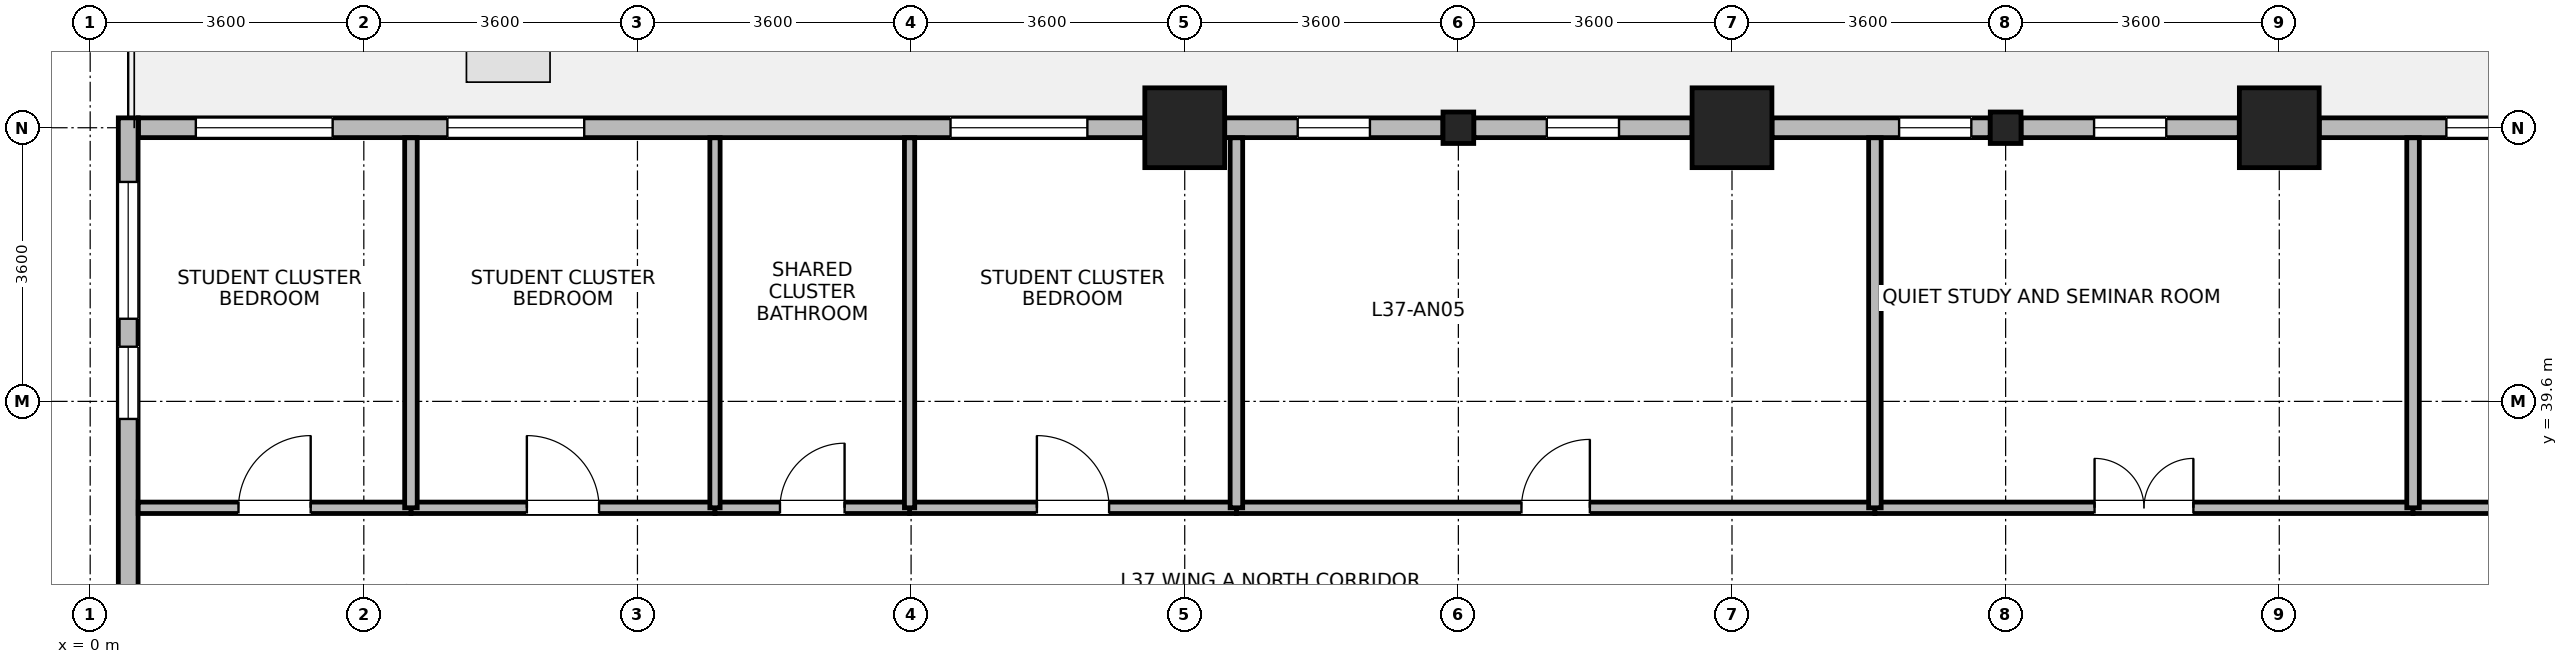
"""IFC4 building model, lengths in metres.
Left out: names, types, materials, properties, quantities, classifications, styles, units other than length and angle.
Written with IfcOpenShell. Run it as: python <this file> out.ifc"""

import sys

from ifc_helpers import new_model, si_unit, direction, frame, frame_2d, origin, origin_2d, place, context, subcontext, project, spatial, rectangle, i_section, extrude, source, transform, mapped, element, fill, save


model = new_model("IFC4")
c1 = context("Model", 3, precision=1e-05, world=origin(), true_north=direction((0.0, 1.0)))
c2 = subcontext(c1, "Body", "Model", "MODEL_VIEW")
j1 = project(units=[si_unit("LENGTHUNIT", "METRE"), si_unit("PLANEANGLEUNIT", "RADIAN")], contexts=[c1])
p1 = place(None, origin())
s1 = spatial("IfcSite", under=j1, at=p1, CompositionType="ELEMENT")
p2 = place(p1, origin())
s2 = spatial("IfcBuilding", under=s1, at=p2, CompositionType="ELEMENT")
p3 = place(p2, frame((0.0, 0.0, 147.6)))
s3 = spatial("IfcBuildingStorey", under=s2, at=p3, CompositionType="ELEMENT", Elevation=147.6)
m1 = source(origin(), c2, "Body", "SweptSolid", [
    extrude(rectangle(XDim=1.05, YDim=1.05, at=origin_2d()), origin(), (0.0, 0.0, 1.0), 3.7),
])
for number, where, z_axis, x_axis in (
    (1, (14.4, 43.2, 0.0), (0.0, 0.0, 1.0), (1.0, 0.0, 0.0)),
    (2, (21.6, 43.2, 0.0), (0.0, 0.0, 1.0), (1.0, 0.0, 0.0)),
    (3, (28.8, 43.2, 0.0), (0.0, 0.0, 1.0), (1.0, 0.0, 0.0)),
):
    element("IfcColumn", number, at=place(p3, frame(where, z_axis=z_axis, x_axis=x_axis)), inside=s3, PredefinedType="COLUMN", context=c2, shape_type="MappedRepresentation", body=[
        mapped(m1, transform((0.0, 0.0, 0.0), x_axis=(1.0, 0.0, 0.0), y_axis=(0.0, 1.0, 0.0), z_axis=(0.0, 0.0, 1.0), scale=1.0)),
    ])
m2 = source(origin(), c2, "Body", "SweptSolid", [
    extrude(i_section(OverallWidth=0.404, OverallDepth=0.414, WebThickness=0.021, FlangeThickness=0.028, FilletRadius=0.015, at=origin_2d()), origin(), (0.0, 0.0, 1.0), 3.7),
])
for number, where, z_axis, x_axis in (
    (4, (18.0, 43.2, 0.0), (0.0, 0.0, 1.0), (1.0, 0.0, 0.0)),
    (5, (25.2, 43.2, 0.0), (0.0, 0.0, 1.0), (1.0, 0.0, 0.0)),
):
    element("IfcColumn", number, at=place(p3, frame(where, z_axis=z_axis, x_axis=x_axis)), inside=s3, PredefinedType="COLUMN", context=c2, shape_type="MappedRepresentation", body=[
        mapped(m2, transform((0.0, 0.0, 0.0), x_axis=(1.0, 0.0, 0.0), y_axis=(0.0, 1.0, 0.0), z_axis=(0.0, 0.0, 1.0), scale=1.0)),
    ])
p4 = place(p3, frame((29.326, 43.2, 0.0), z_axis=(0.0, 0.0, 1.0), x_axis=(1.0, 0.0, 0.0)))
e6 = element("IfcWall", 6, at=p4, inside=s3, PredefinedType="STANDARD", context=c2, shape_type="SweptSolid", body=[
    extrude(rectangle(XDim=2.871, YDim=0.26, at=frame_2d((1.436, 0.0))), origin(), (0.0, 0.0, 1.0), 2.99),
])
p5 = place(p4, frame((1.673, 0.0, 0.85)))
e7 = element("IfcOpeningElement", 7, at=p5, cuts=e6, PredefinedType="OPENING", context=c2, shape_type="SweptSolid", body=[
    extrude(rectangle(XDim=0.95, YDim=1.75, at=frame_2d((0.475, 0.875))), frame((0.0, 0.14, 0.0), z_axis=(0.0, -1.0, 0.0), x_axis=(1.0, 0.0, 0.0)), (0.0, 0.0, 1.0), 0.28),
])
p6 = place(p3, frame((25.403, 43.2, 0.0), z_axis=(0.0, 0.0, 1.0), x_axis=(1.0, 0.0, 0.0)))
e8 = element("IfcWall", 8, at=p6, inside=s3, PredefinedType="STANDARD", context=c2, shape_type="SweptSolid", body=[
    extrude(rectangle(XDim=2.871, YDim=0.26, at=frame_2d((1.436, 0.0))), origin(), (0.0, 0.0, 1.0), 2.99),
])
p7 = place(p6, frame((0.96, 0.0, 0.85)))
e9 = element("IfcOpeningElement", 9, at=p7, cuts=e8, PredefinedType="OPENING", context=c2, shape_type="SweptSolid", body=[
    extrude(rectangle(XDim=0.95, YDim=1.75, at=frame_2d((0.475, 0.875))), frame((0.0, 0.14, 0.0), z_axis=(0.0, -1.0, 0.0), x_axis=(1.0, 0.0, 0.0)), (0.0, 0.0, 1.0), 0.28),
])
p8 = place(p3, frame((22.126, 43.2, 0.0), z_axis=(0.0, 0.0, 1.0), x_axis=(1.0, 0.0, 0.0)))
e10 = element("IfcWall", 10, at=p8, inside=s3, PredefinedType="STANDARD", context=c2, shape_type="SweptSolid", body=[
    extrude(rectangle(XDim=2.871, YDim=0.26, at=frame_2d((1.436, 0.0))), origin(), (0.0, 0.0, 1.0), 2.99),
])
p9 = place(p8, frame((1.673, 0.0, 0.85)))
e11 = element("IfcOpeningElement", 11, at=p9, cuts=e10, PredefinedType="OPENING", context=c2, shape_type="SweptSolid", body=[
    extrude(rectangle(XDim=0.95, YDim=1.75, at=frame_2d((0.475, 0.875))), frame((0.0, 0.14, 0.0), z_axis=(0.0, -1.0, 0.0), x_axis=(1.0, 0.0, 0.0)), (0.0, 0.0, 1.0), 0.28),
])
p10 = place(p3, frame((18.203, 43.2, 0.0), z_axis=(0.0, 0.0, 1.0), x_axis=(1.0, 0.0, 0.0)))
e12 = element("IfcWall", 12, at=p10, inside=s3, PredefinedType="STANDARD", context=c2, shape_type="SweptSolid", body=[
    extrude(rectangle(XDim=2.871, YDim=0.26, at=frame_2d((1.436, 0.0))), origin(), (0.0, 0.0, 1.0), 2.99),
])
p11 = place(p10, frame((0.96, 0.0, 0.85)))
e13 = element("IfcOpeningElement", 13, at=p11, cuts=e12, PredefinedType="OPENING", context=c2, shape_type="SweptSolid", body=[
    extrude(rectangle(XDim=0.95, YDim=1.75, at=frame_2d((0.475, 0.875))), frame((0.0, 0.14, 0.0), z_axis=(0.0, -1.0, 0.0), x_axis=(1.0, 0.0, 0.0)), (0.0, 0.0, 1.0), 0.28),
])
p12 = place(p3, frame((14.926, 43.2, 0.0), z_axis=(0.0, 0.0, 1.0), x_axis=(1.0, 0.0, 0.0)))
e14 = element("IfcWall", 14, at=p12, inside=s3, PredefinedType="STANDARD", context=c2, shape_type="SweptSolid", body=[
    extrude(rectangle(XDim=2.871, YDim=0.26, at=frame_2d((1.436, 0.0))), origin(), (0.0, 0.0, 1.0), 2.99),
])
p13 = place(p12, frame((0.96, 0.0, 0.85)))
e15 = element("IfcOpeningElement", 15, at=p13, cuts=e14, PredefinedType="OPENING", context=c2, shape_type="SweptSolid", body=[
    extrude(rectangle(XDim=0.95, YDim=1.75, at=frame_2d((0.475, 0.875))), frame((0.0, 0.14, 0.0), z_axis=(0.0, -1.0, 0.0), x_axis=(1.0, 0.0, 0.0)), (0.0, 0.0, 1.0), 0.28),
])
p14 = place(p3, frame((0.635, 43.2, 0.0), z_axis=(0.0, 0.0, 1.0), x_axis=(1.0, 0.0, 0.0)))
e16 = element("IfcWall", 16, at=p14, inside=s3, PredefinedType="STANDARD", context=c2, shape_type="SweptSolid", body=[
    extrude(rectangle(XDim=13.239, YDim=0.26, at=frame_2d((6.62, 0.0))), origin(), (0.0, 0.0, 1.0), 3.44),
])
p15 = place(p14, frame((0.755, 0.0, 0.85)))
e17 = element("IfcOpeningElement", 17, at=p15, cuts=e16, PredefinedType="OPENING", context=c2, shape_type="SweptSolid", body=[
    extrude(rectangle(XDim=1.8, YDim=1.85, at=frame_2d((0.9, 0.925))), frame((0.0, 0.14, 0.0), z_axis=(0.0, -1.0, 0.0), x_axis=(1.0, 0.0, 0.0)), (0.0, 0.0, 1.0), 0.28),
])
p16 = place(p14, frame((4.065, 0.0, 0.85)))
e18 = element("IfcOpeningElement", 18, at=p16, cuts=e16, PredefinedType="OPENING", context=c2, shape_type="SweptSolid", body=[
    extrude(rectangle(XDim=1.8, YDim=1.85, at=frame_2d((0.9, 0.925))), frame((0.0, 0.14, 0.0), z_axis=(0.0, -1.0, 0.0), x_axis=(1.0, 0.0, 0.0)), (0.0, 0.0, 1.0), 0.28),
])
p17 = place(p14, frame((10.684, 0.0, 0.85)))
e19 = element("IfcOpeningElement", 19, at=p17, cuts=e16, PredefinedType="OPENING", context=c2, shape_type="SweptSolid", body=[
    extrude(rectangle(XDim=1.8, YDim=1.85, at=frame_2d((0.9, 0.925))), frame((0.0, 0.14, 0.0), z_axis=(0.0, -1.0, 0.0), x_axis=(1.0, 0.0, 0.0)), (0.0, 0.0, 1.0), 0.28),
])
p18 = place(p3, frame((0.5, 36.358, 0.0), z_axis=(0.0, 0.0, 1.0), x_axis=(0.0, 1.0, 0.0)))
e20 = element("IfcWall", 20, at=p18, inside=s3, PredefinedType="STANDARD", context=c2, shape_type="SweptSolid", body=[
    extrude(rectangle(XDim=6.972, YDim=0.26, at=frame_2d((3.486, 0.0))), origin(), (0.0, 0.0, 1.0), 3.44),
])
p19 = place(p18, frame((4.329, 0.0, 0.85)))
e21 = element("IfcOpeningElement", 21, at=p19, cuts=e20, PredefinedType="OPENING", context=c2, shape_type="SweptSolid", body=[
    extrude(rectangle(XDim=1.8, YDim=1.85, at=frame_2d((0.9, 0.925))), frame((0.0, 0.14, 0.0), z_axis=(0.0, -1.0, 0.0), x_axis=(1.0, 0.0, 0.0)), (0.0, 0.0, 1.0), 0.28),
])
p20 = place(p18, frame((3.011, 0.0, 0.85)))
e22 = element("IfcOpeningElement", 22, at=p20, cuts=e20, PredefinedType="OPENING", context=c2, shape_type="SweptSolid", body=[
    extrude(rectangle(XDim=0.95, YDim=1.75, at=frame_2d((0.475, 0.875))), frame((0.0, 0.14, 0.0), z_axis=(0.0, -1.0, 0.0), x_axis=(1.0, 0.0, 0.0)), (0.0, 0.0, 1.0), 0.28),
])
p21 = place(p3, frame((15.08, 38.2, 0.0), z_axis=(0.0, 0.0, 1.0), x_axis=(1.0, 0.0, 0.0)))
e23 = element("IfcWall", 23, at=p21, inside=s3, PredefinedType="PARTITIONING", context=c2, shape_type="SweptSolid", body=[
    extrude(rectangle(XDim=8.4, YDim=0.15, at=frame_2d((4.2, 0.0))), origin(), (0.0, 0.0, 1.0), 3.44),
])
p22 = place(p21, frame((3.75, 0.0, 0.0)))
e24 = element("IfcOpeningElement", 24, at=p22, cuts=e23, PredefinedType="OPENING", context=c2, shape_type="SweptSolid", body=[
    extrude(rectangle(XDim=0.9, YDim=2.08, at=frame_2d((0.45, 1.04))), frame((0.0, 0.085, 0.0), z_axis=(0.0, -1.0, 0.0), x_axis=(1.0, 0.0, 0.0)), (0.0, 0.0, 1.0), 0.17),
])
p23 = place(p3, frame((23.48, 38.2, 0.0), z_axis=(0.0, 0.0, 1.0), x_axis=(1.0, 0.0, 0.0)))
e25 = element("IfcWall", 25, at=p23, inside=s3, PredefinedType="PARTITIONING", context=c2, shape_type="SweptSolid", body=[
    extrude(rectangle(XDim=7.08, YDim=0.15, at=frame_2d((3.54, 0.0))), origin(), (0.0, 0.0, 1.0), 3.44),
])
p24 = place(p23, frame((2.89, 0.0, 0.0)))
e26 = element("IfcOpeningElement", 26, at=p24, cuts=e25, PredefinedType="OPENING", context=c2, shape_type="SweptSolid", body=[
    extrude(rectangle(XDim=1.3, YDim=2.12, at=frame_2d((0.65, 1.06))), frame((0.0, 0.085, 0.0), z_axis=(0.0, -1.0, 0.0), x_axis=(1.0, 0.0, 0.0)), (0.0, 0.0, 1.0), 0.17),
])
p25 = place(p3, frame((30.56, 38.2, 0.0), z_axis=(0.0, 0.0, 1.0), x_axis=(1.0, 0.0, 0.0)))
e27 = element("IfcWall", 27, at=p25, inside=s3, PredefinedType="PARTITIONING", context=c2, shape_type="SweptSolid", body=[
    extrude(rectangle(XDim=4.8, YDim=0.15, at=frame_2d((2.4, 0.0))), origin(), (0.0, 0.0, 1.0), 3.44),
])
p26 = place(p25, frame((1.75, 0.0, 0.0)))
e28 = element("IfcOpeningElement", 28, at=p26, cuts=e27, PredefinedType="OPENING", context=c2, shape_type="SweptSolid", body=[
    extrude(rectangle(XDim=1.3, YDim=2.12, at=frame_2d((0.65, 1.06))), frame((0.0, 0.085, 0.0), z_axis=(0.0, -1.0, 0.0), x_axis=(1.0, 0.0, 0.0)), (0.0, 0.0, 1.0), 0.17),
])
p27 = place(p3, frame((10.78, 38.2, 0.0), z_axis=(0.0, 0.0, 1.0), x_axis=(1.0, 0.0, 0.0)))
e29 = element("IfcWall", 29, at=p27, inside=s3, PredefinedType="PARTITIONING", context=c2, shape_type="SweptSolid", body=[
    extrude(rectangle(XDim=4.3, YDim=0.15, at=frame_2d((2.15, 0.0))), origin(), (0.0, 0.0, 1.0), 3.44),
])
p28 = place(p27, frame((1.675, 0.0, 0.0)))
e30 = element("IfcOpeningElement", 30, at=p28, cuts=e29, PredefinedType="OPENING", context=c2, shape_type="SweptSolid", body=[
    extrude(rectangle(XDim=0.95, YDim=2.1, at=frame_2d((0.475, 1.05))), frame((0.0, 0.085, 0.0), z_axis=(0.0, -1.0, 0.0), x_axis=(1.0, 0.0, 0.0)), (0.0, 0.0, 1.0), 0.17),
])
p29 = place(p3, frame((4.22, 38.2, 0.0), z_axis=(0.0, 0.0, 1.0), x_axis=(1.0, 0.0, 0.0)))
e31 = element("IfcWall", 31, at=p29, inside=s3, PredefinedType="PARTITIONING", context=c2, shape_type="SweptSolid", body=[
    extrude(rectangle(XDim=4.0, YDim=0.15, at=frame_2d((2.0, 0.0))), origin(), (0.0, 0.0, 1.0), 3.44),
])
p30 = place(p29, frame((1.525, 0.0, 0.0)))
e32 = element("IfcOpeningElement", 32, at=p30, cuts=e31, PredefinedType="OPENING", context=c2, shape_type="SweptSolid", body=[
    extrude(rectangle(XDim=0.95, YDim=2.1, at=frame_2d((0.475, 1.05))), frame((0.0, 0.085, 0.0), z_axis=(0.0, -1.0, 0.0), x_axis=(1.0, 0.0, 0.0)), (0.0, 0.0, 1.0), 0.17),
])
p31 = place(p3, frame((0.632, 38.2, 0.0), z_axis=(0.0, 0.0, 1.0), x_axis=(1.0, 0.0, 0.0)))
e33 = element("IfcWall", 33, at=p31, inside=s3, PredefinedType="PARTITIONING", context=c2, shape_type="SweptSolid", body=[
    extrude(rectangle(XDim=3.588, YDim=0.15, at=frame_2d((1.794, 0.0))), origin(), (0.0, 0.0, 1.0), 3.44),
])
p32 = place(p31, frame((1.319, 0.0, 0.0)))
e34 = element("IfcOpeningElement", 34, at=p32, cuts=e33, PredefinedType="OPENING", context=c2, shape_type="SweptSolid", body=[
    extrude(rectangle(XDim=0.95, YDim=2.1, at=frame_2d((0.475, 1.05))), frame((0.0, 0.085, 0.0), z_axis=(0.0, -1.0, 0.0), x_axis=(1.0, 0.0, 0.0)), (0.0, 0.0, 1.0), 0.17),
])
p33 = place(p3, frame((8.22, 38.2, 0.0), z_axis=(0.0, 0.0, 1.0), x_axis=(1.0, 0.0, 0.0)))
e35 = element("IfcWall", 35, at=p33, inside=s3, PredefinedType="PARTITIONING", context=c2, shape_type="SweptSolid", body=[
    extrude(rectangle(XDim=2.56, YDim=0.15, at=frame_2d((1.28, 0.0))), origin(), (0.0, 0.0, 1.0), 3.44),
])
p34 = place(p33, frame((0.855, 0.0, 0.0)))
e36 = element("IfcOpeningElement", 36, at=p34, cuts=e35, PredefinedType="OPENING", context=c2, shape_type="SweptSolid", body=[
    extrude(rectangle(XDim=0.85, YDim=2.04, at=frame_2d((0.425, 1.02))), frame((0.0, 0.085, 0.0), z_axis=(0.0, -1.0, 0.0), x_axis=(1.0, 0.0, 0.0)), (0.0, 0.0, 1.0), 0.17),
])
p35 = place(p3, frame((4.22, 38.2, 0.0), z_axis=(0.0, 0.0, 1.0), x_axis=(0.0, 1.0, 0.0)))
e37 = element("IfcWall", 37, at=p35, inside=s3, PredefinedType="PARTITIONING", context=c2, shape_type="SweptSolid", body=[
    extrude(rectangle(XDim=4.868, YDim=0.165, at=frame_2d((2.434, 0.0))), origin(), (0.0, 0.0, 1.0), 3.44),
])
for number, where, z_axis, x_axis in (
    (38, (8.22, 38.2, 0.0), (0.0, 0.0, 1.0), (0.0, 1.0, 0.0)),
    (39, (10.78, 38.2, 0.0), (0.0, 0.0, 1.0), (0.0, 1.0, 0.0)),
):
    element("IfcWall", number, at=place(p3, frame(where, z_axis=z_axis, x_axis=x_axis)), inside=s3, PredefinedType="PARTITIONING", context=c2, shape_type="SweptSolid", body=[
        extrude(rectangle(XDim=4.868, YDim=0.135, at=frame_2d((2.434, 0.0))), origin(), (0.0, 0.0, 1.0), 3.44),
    ])
for number, where, z_axis, x_axis in (
    (40, (15.08, 38.2, 0.0), (0.0, 0.0, 1.0), (0.0, 1.0, 0.0)),
    (41, (23.48, 38.2, 0.0), (0.0, 0.0, 1.0), (0.0, 1.0, 0.0)),
    (42, (30.56, 38.2, 0.0), (0.0, 0.0, 1.0), (0.0, 1.0, 0.0)),
):
    element("IfcWall", number, at=place(p3, frame(where, z_axis=z_axis, x_axis=x_axis)), inside=s3, PredefinedType="PARTITIONING", context=c2, shape_type="SweptSolid", body=[
        extrude(rectangle(XDim=4.868, YDim=0.165, at=frame_2d((2.434, 0.0))), origin(), (0.0, 0.0, 1.0), 3.44),
    ])
p36 = place(p5, origin())
e43 = element("IfcWindow", 43, at=p36, inside=s3, PartitioningType="SINGLE_PANEL", PredefinedType="WINDOW", context=c2, shape_type="SweptSolid", body=[
    extrude(rectangle(XDim=0.95, YDim=1.75, at=frame_2d((0.475, 0.875))), frame((0.0, 0.03, 0.0), z_axis=(0.0, -1.0, 0.0), x_axis=(1.0, 0.0, 0.0)), (0.0, 0.0, 1.0), 0.06),
])
fill(e7, e43)
p37 = place(p7, origin())
e44 = element("IfcWindow", 44, at=p37, inside=s3, PartitioningType="SINGLE_PANEL", PredefinedType="WINDOW", context=c2, shape_type="SweptSolid", body=[
    extrude(rectangle(XDim=0.95, YDim=1.75, at=frame_2d((0.475, 0.875))), frame((0.0, 0.03, 0.0), z_axis=(0.0, -1.0, 0.0), x_axis=(1.0, 0.0, 0.0)), (0.0, 0.0, 1.0), 0.06),
])
fill(e9, e44)
p38 = place(p9, origin())
e45 = element("IfcWindow", 45, at=p38, inside=s3, PartitioningType="SINGLE_PANEL", PredefinedType="WINDOW", context=c2, shape_type="SweptSolid", body=[
    extrude(rectangle(XDim=0.95, YDim=1.75, at=frame_2d((0.475, 0.875))), frame((0.0, 0.03, 0.0), z_axis=(0.0, -1.0, 0.0), x_axis=(1.0, 0.0, 0.0)), (0.0, 0.0, 1.0), 0.06),
])
fill(e11, e45)
p39 = place(p11, origin())
e46 = element("IfcWindow", 46, at=p39, inside=s3, PartitioningType="SINGLE_PANEL", PredefinedType="WINDOW", context=c2, shape_type="SweptSolid", body=[
    extrude(rectangle(XDim=0.95, YDim=1.75, at=frame_2d((0.475, 0.875))), frame((0.0, 0.03, 0.0), z_axis=(0.0, -1.0, 0.0), x_axis=(1.0, 0.0, 0.0)), (0.0, 0.0, 1.0), 0.06),
])
fill(e13, e46)
p40 = place(p13, origin())
e47 = element("IfcWindow", 47, at=p40, inside=s3, PartitioningType="SINGLE_PANEL", PredefinedType="WINDOW", context=c2, shape_type="SweptSolid", body=[
    extrude(rectangle(XDim=0.95, YDim=1.75, at=frame_2d((0.475, 0.875))), frame((0.0, 0.03, 0.0), z_axis=(0.0, -1.0, 0.0), x_axis=(1.0, 0.0, 0.0)), (0.0, 0.0, 1.0), 0.06),
])
fill(e15, e47)
p41 = place(p15, origin())
e48 = element("IfcWindow", 48, at=p41, inside=s3, PartitioningType="SINGLE_PANEL", PredefinedType="WINDOW", context=c2, shape_type="SweptSolid", body=[
    extrude(rectangle(XDim=1.8, YDim=1.85, at=frame_2d((0.9, 0.925))), frame((0.0, 0.03, 0.0), z_axis=(0.0, -1.0, 0.0), x_axis=(1.0, 0.0, 0.0)), (0.0, 0.0, 1.0), 0.06),
])
fill(e17, e48)
p42 = place(p16, origin())
e49 = element("IfcWindow", 49, at=p42, inside=s3, PartitioningType="SINGLE_PANEL", PredefinedType="WINDOW", context=c2, shape_type="SweptSolid", body=[
    extrude(rectangle(XDim=1.8, YDim=1.85, at=frame_2d((0.9, 0.925))), frame((0.0, 0.03, 0.0), z_axis=(0.0, -1.0, 0.0), x_axis=(1.0, 0.0, 0.0)), (0.0, 0.0, 1.0), 0.06),
])
fill(e18, e49)
p43 = place(p17, origin())
e50 = element("IfcWindow", 50, at=p43, inside=s3, PartitioningType="SINGLE_PANEL", PredefinedType="WINDOW", context=c2, shape_type="SweptSolid", body=[
    extrude(rectangle(XDim=1.8, YDim=1.85, at=frame_2d((0.9, 0.925))), frame((0.0, 0.03, 0.0), z_axis=(0.0, -1.0, 0.0), x_axis=(1.0, 0.0, 0.0)), (0.0, 0.0, 1.0), 0.06),
])
fill(e19, e50)
p44 = place(p19, origin())
e51 = element("IfcWindow", 51, at=p44, inside=s3, PartitioningType="SINGLE_PANEL", PredefinedType="WINDOW", context=c2, shape_type="SweptSolid", body=[
    extrude(rectangle(XDim=1.8, YDim=1.85, at=frame_2d((0.9, 0.925))), frame((0.0, 0.03, 0.0), z_axis=(0.0, -1.0, 0.0), x_axis=(1.0, 0.0, 0.0)), (0.0, 0.0, 1.0), 0.06),
])
fill(e21, e51)
p45 = place(p20, origin())
e52 = element("IfcWindow", 52, at=p45, inside=s3, PartitioningType="SINGLE_PANEL", PredefinedType="WINDOW", context=c2, shape_type="SweptSolid", body=[
    extrude(rectangle(XDim=0.95, YDim=1.75, at=frame_2d((0.475, 0.875))), frame((0.0, 0.03, 0.0), z_axis=(0.0, -1.0, 0.0), x_axis=(1.0, 0.0, 0.0)), (0.0, 0.0, 1.0), 0.06),
])
fill(e22, e52)
p46 = place(p22, origin())
e53 = element("IfcDoor", 53, at=p46, inside=s3, OperationType="SINGLE_SWING_RIGHT", PredefinedType="DOOR", context=c2, shape_type="SweptSolid", body=[
    extrude(rectangle(XDim=0.9, YDim=2.08, at=frame_2d((0.45, 1.04))), frame((0.0, 0.025, 0.0), z_axis=(0.0, -1.0, 0.0), x_axis=(1.0, 0.0, 0.0)), (0.0, 0.0, 1.0), 0.05),
])
fill(e24, e53)
p47 = place(p24, origin())
e54 = element("IfcDoor", 54, at=p47, inside=s3, OperationType="DOUBLE_DOOR_SINGLE_SWING", PredefinedType="DOOR", context=c2, shape_type="SweptSolid", body=[
    extrude(rectangle(XDim=1.3, YDim=2.12, at=frame_2d((0.65, 1.06))), frame((0.0, 0.025, 0.0), z_axis=(0.0, -1.0, 0.0), x_axis=(1.0, 0.0, 0.0)), (0.0, 0.0, 1.0), 0.05),
])
fill(e26, e54)
p48 = place(p28, origin())
e55 = element("IfcDoor", 55, at=p48, inside=s3, OperationType="SINGLE_SWING_LEFT", PredefinedType="DOOR", context=c2, shape_type="SweptSolid", body=[
    extrude(rectangle(XDim=0.95, YDim=2.1, at=frame_2d((0.475, 1.05))), frame((0.0, 0.025, 0.0), z_axis=(0.0, -1.0, 0.0), x_axis=(1.0, 0.0, 0.0)), (0.0, 0.0, 1.0), 0.05),
])
fill(e30, e55)
p49 = place(p30, origin())
e56 = element("IfcDoor", 56, at=p49, inside=s3, OperationType="SINGLE_SWING_LEFT", PredefinedType="DOOR", context=c2, shape_type="SweptSolid", body=[
    extrude(rectangle(XDim=0.95, YDim=2.1, at=frame_2d((0.475, 1.05))), frame((0.0, 0.025, 0.0), z_axis=(0.0, -1.0, 0.0), x_axis=(1.0, 0.0, 0.0)), (0.0, 0.0, 1.0), 0.05),
])
fill(e32, e56)
p50 = place(p32, origin())
e57 = element("IfcDoor", 57, at=p50, inside=s3, OperationType="SINGLE_SWING_RIGHT", PredefinedType="DOOR", context=c2, shape_type="SweptSolid", body=[
    extrude(rectangle(XDim=0.95, YDim=2.1, at=frame_2d((0.475, 1.05))), frame((0.0, 0.025, 0.0), z_axis=(0.0, -1.0, 0.0), x_axis=(1.0, 0.0, 0.0)), (0.0, 0.0, 1.0), 0.05),
])
fill(e34, e57)
p51 = place(p34, origin())
e58 = element("IfcDoor", 58, at=p51, inside=s3, OperationType="SINGLE_SWING_RIGHT", PredefinedType="DOOR", context=c2, shape_type="SweptSolid", body=[
    extrude(rectangle(XDim=0.85, YDim=2.04, at=frame_2d((0.425, 1.02))), frame((0.0, 0.025, 0.0), z_axis=(0.0, -1.0, 0.0), x_axis=(1.0, 0.0, 0.0)), (0.0, 0.0, 1.0), 0.05),
])
fill(e36, e58)
save(model, sys.argv[1])
